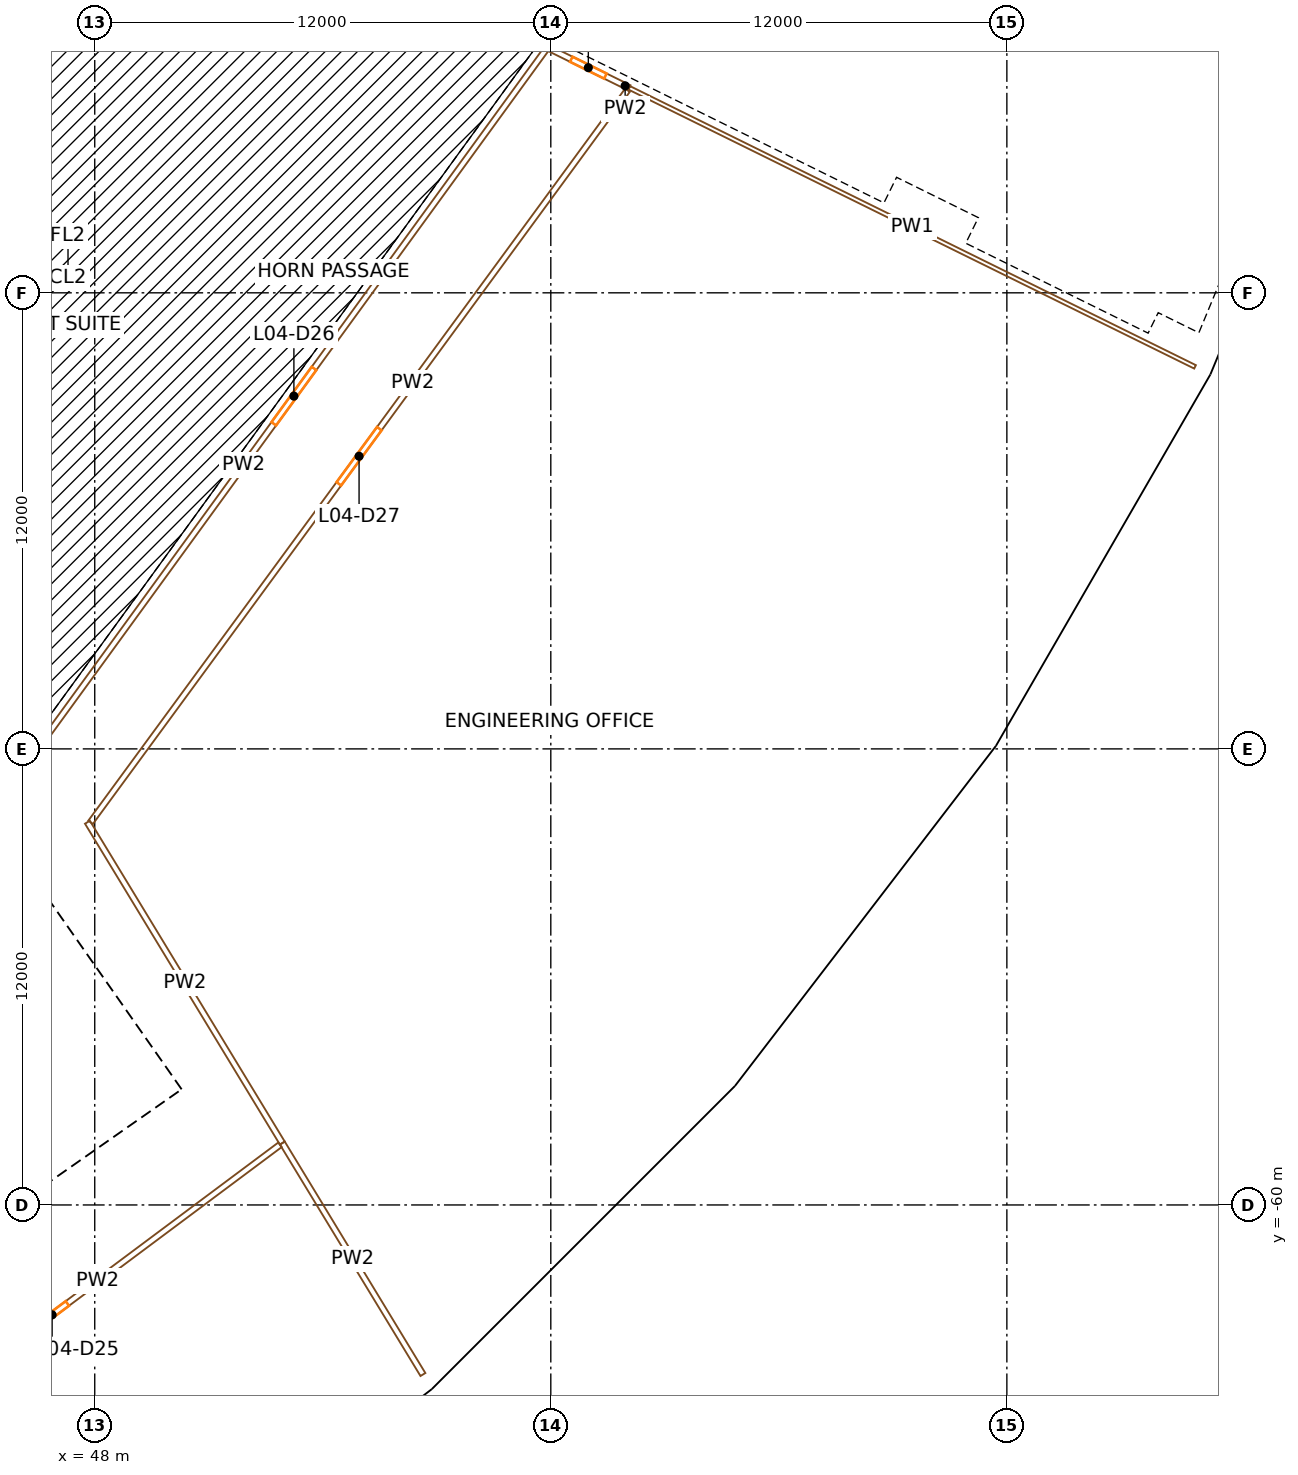
"""IFC4 building model, lengths in metres.
Left out: names, types, materials, properties, quantities, classifications, styles, units other than length and angle.
Written with IfcOpenShell. Run it as: python <this file> out.ifc"""

import sys

from ifc_helpers import new_model, si_unit, direction, frame, frame_2d, origin, origin_2d, place, context, subcontext, project, spatial, rectangle, extrude, element, fill, save


model = new_model("IFC4")
c1 = context("Model", 3, precision=1e-05, world=origin(), true_north=direction((0.0, 1.0)))
c2 = subcontext(c1, "Body", "Model", "MODEL_VIEW")
j1 = project(units=[si_unit("LENGTHUNIT", "METRE"), si_unit("PLANEANGLEUNIT", "RADIAN")], contexts=[c1])
p1 = place(None, origin())
s1 = spatial("IfcSite", under=j1, at=p1, CompositionType="ELEMENT")
p2 = place(p1, origin())
s2 = spatial("IfcBuilding", under=s1, at=p2, CompositionType="ELEMENT")
p3 = place(p2, frame((0.0, 0.0, 31.5)))
s3 = spatial("IfcBuildingStorey", under=s2, at=p3, CompositionType="ELEMENT", Elevation=31.5)
p4 = place(p3, frame((51.264, -58.456, 0.0), z_axis=(0.0, 0.0, 1.0), x_axis=(0.751839807479, 0.6593458151, 0.0)))
e1 = element("IfcColumn", 1, at=p4, inside=s3, PredefinedType="COLUMN", context=c2, shape_type="SweptSolid", body=[
    extrude(rectangle(XDim=1.4, YDim=1.8, at=origin_2d()), origin(), (0.0, 0.0, 1.0), 4.5),
])
p5 = place(p3, frame((56.209, -64.094, 0.0), z_axis=(0.0, 0.0, 1.0), x_axis=(0.751839807479, 0.6593458151, 0.0)))
e2 = element("IfcColumn", 2, at=p5, inside=s3, PredefinedType="COLUMN", context=c2, shape_type="SweptSolid", body=[
    extrude(rectangle(XDim=1.1, YDim=1.3, at=origin_2d()), origin(), (0.0, 0.0, 1.0), 4.5),
])
p6 = place(p3, frame((58.456, -51.264, 0.0), z_axis=(0.0, 0.0, 1.0), x_axis=(0.6593458151, 0.751839807479, 0.0)))
e3 = element("IfcColumn", 3, at=p6, inside=s3, PredefinedType="COLUMN", context=c2, shape_type="SweptSolid", body=[
    extrude(rectangle(XDim=1.4, YDim=1.8, at=origin_2d()), origin(), (0.0, 0.0, 1.0), 4.5),
])
p7 = place(p3, frame((64.094, -56.209, 0.0), z_axis=(0.0, 0.0, 1.0), x_axis=(0.6593458151, 0.751839807479, 0.0)))
e4 = element("IfcColumn", 4, at=p7, inside=s3, PredefinedType="COLUMN", context=c2, shape_type="SweptSolid", body=[
    extrude(rectangle(XDim=1.1, YDim=1.3, at=origin_2d()), origin(), (0.0, 0.0, 1.0), 4.5),
])
for number, where, z_axis, x_axis in (
    (5, (48.433, -32.362, 0.0), (0.0, 0.0, 1.0), (0.556, 0.831, 0.0)),
    (6, (64.647, -43.196, 0.0), (0.0, 0.0, 1.0), (0.556, 0.831, 0.0)),
):
    element("IfcColumn", number, at=place(p3, frame(where, z_axis=z_axis, x_axis=x_axis)), inside=s3, PredefinedType="COLUMN", context=c2, shape_type="SweptSolid", body=[
        extrude(rectangle(XDim=1.4, YDim=1.8, at=origin_2d()), origin(), (0.0, 0.0, 1.0), 4.5),
    ])
p8 = place(p3, frame((70.883, -47.362, 0.0), z_axis=(0.0, 0.0, 1.0), x_axis=(0.55557023302, 0.831469612303, 0.0)))
e7 = element("IfcColumn", 7, at=p8, inside=s3, PredefinedType="COLUMN", context=c2, shape_type="SweptSolid", body=[
    extrude(rectangle(XDim=1.1, YDim=1.3, at=origin_2d()), origin(), (0.0, 0.0, 1.0), 4.5),
])
p9 = place(p3, frame((69.732, -34.388, 0.0), z_axis=(0.0, 0.0, 1.0), x_axis=(0.442288690219, 0.896872741533, 0.0)))
e8 = element("IfcColumn", 8, at=p9, inside=s3, PredefinedType="COLUMN", context=c2, shape_type="SweptSolid", body=[
    extrude(rectangle(XDim=1.4, YDim=1.8, at=origin_2d()), origin(), (0.0, 0.0, 1.0), 4.5),
])
p10 = place(p3, frame((76.458, -37.705, 0.0), z_axis=(0.0, 0.0, 1.0), x_axis=(0.442288690219, 0.896872741533, 0.0)))
e9 = element("IfcColumn", 9, at=p10, inside=s3, PredefinedType="COLUMN", context=c2, shape_type="SweptSolid", body=[
    extrude(rectangle(XDim=1.1, YDim=1.3, at=origin_2d()), origin(), (0.0, 0.0, 1.0), 4.5),
])
p11 = place(p3, frame((49.779, -57.191, 0.0), z_axis=(0.0, 0.0, 1.0), x_axis=(-0.573577477574, 0.819151315216, 0.0)))
e10 = element("IfcWall", 10, at=p11, inside=s3, PredefinedType="SHEAR", context=c2, shape_type="SweptSolid", body=[
    extrude(rectangle(XDim=14.8, YDim=0.9, at=frame_2d((7.4, 0.0))), origin(), (0.0, 0.0, 1.0), 4.1),
])
p12 = place(p11, frame((6.7, 0.0, 0.0)))
e11 = element("IfcOpeningElement", 11, at=p12, cuts=e10, PredefinedType="OPENING", context=c2, shape_type="SweptSolid", body=[
    extrude(rectangle(XDim=1.4, YDim=2.1, at=frame_2d((0.7, 1.05))), frame((0.0, 0.46, 0.0), z_axis=(0.0, -1.0, 0.0), x_axis=(1.0, 0.0, 0.0)), (0.0, 0.0, 1.0), 0.92),
])
p13 = place(p3, frame((36.827, -65.71, 0.0), z_axis=(0.0, 0.0, 1.0), x_axis=(0.819153391756, 0.573574511963, 0.0)))
e12 = element("IfcWall", 12, at=p13, inside=s3, PredefinedType="SHEAR", context=c2, shape_type="SweptSolid", body=[
    extrude(rectangle(XDim=15.045, YDim=0.9, at=frame_2d((7.523, 0.0))), origin(), (0.0, 0.0, 1.0), 4.1),
])
p14 = place(p13, frame((0.6, 0.0, 0.0)))
e13 = element("IfcOpeningElement", 13, at=p14, cuts=e12, PredefinedType="OPENING", context=c2, shape_type="SweptSolid", body=[
    extrude(rectangle(XDim=1.0, YDim=2.1, at=frame_2d((0.5, 1.05))), frame((0.0, 0.46, 0.0), z_axis=(0.0, -1.0, 0.0), x_axis=(1.0, 0.0, 0.0)), (0.0, 0.0, 1.0), 0.92),
])
p15 = place(p13, frame((3.275, 0.0, 0.0)))
e14 = element("IfcOpeningElement", 14, at=p15, cuts=e12, PredefinedType="OPENING", context=c2, shape_type="SweptSolid", body=[
    extrude(rectangle(XDim=1.0, YDim=2.1, at=frame_2d((0.5, 1.05))), frame((0.0, 0.46, 0.0), z_axis=(0.0, -1.0, 0.0), x_axis=(1.0, 0.0, 0.0)), (0.0, 0.0, 1.0), 0.92),
])
p16 = place(p13, frame((6.175, 0.0, 0.0)))
e15 = element("IfcOpeningElement", 15, at=p16, cuts=e12, PredefinedType="OPENING", context=c2, shape_type="SweptSolid", body=[
    extrude(rectangle(XDim=1.0, YDim=2.1, at=frame_2d((0.5, 1.05))), frame((0.0, 0.46, 0.0), z_axis=(0.0, -1.0, 0.0), x_axis=(1.0, 0.0, 0.0)), (0.0, 0.0, 1.0), 0.92),
])
p17 = place(p13, frame((13.495, 0.0, 0.0)))
e16 = element("IfcOpeningElement", 16, at=p17, cuts=e12, PredefinedType="OPENING", context=c2, shape_type="SweptSolid", body=[
    extrude(rectangle(XDim=1.1, YDim=2.1, at=frame_2d((0.55, 1.05))), frame((0.0, 0.46, 0.0), z_axis=(0.0, -1.0, 0.0), x_axis=(1.0, 0.0, 0.0)), (0.0, 0.0, 1.0), 0.92),
])
p18 = place(p3, frame((41.262, -57.661, 0.0), z_axis=(0.0, 0.0, 1.0), x_axis=(0.819164398642, 0.573558792102, 0.0)))
e17 = element("IfcWall", 17, at=p18, inside=s3, PredefinedType="SOLIDWALL", context=c2, shape_type="SweptSolid", body=[
    extrude(rectangle(XDim=6.795, YDim=0.3, at=frame_2d((3.397, 0.0))), origin(), (0.0, 0.0, 1.0), 4.1),
])
p19 = place(p18, frame((5.32, 0.0, 0.0)))
e18 = element("IfcOpeningElement", 18, at=p19, cuts=e17, PredefinedType="OPENING", context=c2, shape_type="SweptSolid", body=[
    extrude(rectangle(XDim=1.1, YDim=2.1, at=frame_2d((0.55, 1.05))), frame((0.0, 0.16, 0.0), z_axis=(0.0, -1.0, 0.0), x_axis=(1.0, 0.0, 0.0)), (0.0, 0.0, 1.0), 0.32),
])
p20 = place(p3, frame((47.839, -71.491, 0.0), z_axis=(0.0, 0.0, 1.0), x_axis=(0.793355377778, 0.608758773695, 0.0)))
e19 = element("IfcWall", 19, at=p20, inside=s3, PredefinedType="SOLIDWALL", context=c2, shape_type="SweptSolid", body=[
    extrude(rectangle(XDim=11.135, YDim=0.45, at=frame_2d((5.567, 0.0))), origin(), (0.0, 0.0, 1.0), 3.2),
])
p21 = place(p20, frame((3.917, 0.0, 0.9)))
e20 = element("IfcOpeningElement", 20, at=p21, cuts=e19, PredefinedType="OPENING", context=c2, shape_type="SweptSolid", body=[
    extrude(rectangle(XDim=1.2, YDim=2.15, at=frame_2d((0.6, 1.075))), frame((0.0, 0.235, 0.0), z_axis=(0.0, -1.0, 0.0), x_axis=(1.0, 0.0, 0.0)), (0.0, 0.0, 1.0), 0.47),
])
p22 = place(p20, frame((6.017, 0.0, 0.9)))
e21 = element("IfcOpeningElement", 21, at=p22, cuts=e19, PredefinedType="OPENING", context=c2, shape_type="SweptSolid", body=[
    extrude(rectangle(XDim=1.2, YDim=2.15, at=frame_2d((0.6, 1.075))), frame((0.0, 0.235, 0.0), z_axis=(0.0, -1.0, 0.0), x_axis=(1.0, 0.0, 0.0)), (0.0, 0.0, 1.0), 0.47),
])
p23 = place(p3, frame((56.699, -64.698, 0.0), z_axis=(0.0, 0.0, 1.0), x_axis=(0.707106781187, 0.707106781187, 0.0)))
e22 = element("IfcWall", 22, at=p23, inside=s3, PredefinedType="SOLIDWALL", context=c2, shape_type="SweptSolid", body=[
    extrude(rectangle(XDim=11.312, YDim=0.45, at=frame_2d((5.656, 0.0))), origin(), (0.0, 0.0, 1.0), 3.2),
])
p24 = place(p23, frame((4.006, 0.0, 0.9)))
e23 = element("IfcOpeningElement", 23, at=p24, cuts=e22, PredefinedType="OPENING", context=c2, shape_type="SweptSolid", body=[
    extrude(rectangle(XDim=1.2, YDim=2.15, at=frame_2d((0.6, 1.075))), frame((0.0, 0.235, 0.0), z_axis=(0.0, -1.0, 0.0), x_axis=(1.0, 0.0, 0.0)), (0.0, 0.0, 1.0), 0.47),
])
p25 = place(p23, frame((6.106, 0.0, 0.9)))
e24 = element("IfcOpeningElement", 24, at=p25, cuts=e22, PredefinedType="OPENING", context=c2, shape_type="SweptSolid", body=[
    extrude(rectangle(XDim=1.2, YDim=2.15, at=frame_2d((0.6, 1.075))), frame((0.0, 0.235, 0.0), z_axis=(0.0, -1.0, 0.0), x_axis=(1.0, 0.0, 0.0)), (0.0, 0.0, 1.0), 0.47),
])
p26 = place(p3, frame((64.713, -56.673, 0.0), z_axis=(0.0, 0.0, 1.0), x_axis=(0.608758773695, 0.793355377778, 0.0)))
e25 = element("IfcWall", 25, at=p26, inside=s3, PredefinedType="SOLIDWALL", context=c2, shape_type="SweptSolid", body=[
    extrude(rectangle(XDim=11.135, YDim=0.45, at=frame_2d((5.567, 0.0))), origin(), (0.0, 0.0, 1.0), 3.2),
])
p27 = place(p26, frame((3.917, 0.0, 0.9)))
e26 = element("IfcOpeningElement", 26, at=p27, cuts=e25, PredefinedType="OPENING", context=c2, shape_type="SweptSolid", body=[
    extrude(rectangle(XDim=1.2, YDim=2.15, at=frame_2d((0.6, 1.075))), frame((0.0, 0.235, 0.0), z_axis=(0.0, -1.0, 0.0), x_axis=(1.0, 0.0, 0.0)), (0.0, 0.0, 1.0), 0.47),
])
p28 = place(p26, frame((6.017, 0.0, 0.9)))
e27 = element("IfcOpeningElement", 27, at=p28, cuts=e25, PredefinedType="OPENING", context=c2, shape_type="SweptSolid", body=[
    extrude(rectangle(XDim=1.2, YDim=2.15, at=frame_2d((0.6, 1.075))), frame((0.0, 0.235, 0.0), z_axis=(0.0, -1.0, 0.0), x_axis=(1.0, 0.0, 0.0)), (0.0, 0.0, 1.0), 0.47),
])
p29 = place(p3, frame((71.512, -47.819, 0.0), z_axis=(0.0, 0.0, 1.0), x_axis=(0.500001430823, 0.866024577697, 0.0)))
e28 = element("IfcWall", 28, at=p29, inside=s3, PredefinedType="SOLIDWALL", context=c2, shape_type="SweptSolid", body=[
    extrude(rectangle(XDim=11.312, YDim=0.45, at=frame_2d((5.656, 0.0))), origin(), (0.0, 0.0, 1.0), 3.2),
])
p30 = place(p29, frame((4.006, 0.0, 0.9)))
e29 = element("IfcOpeningElement", 29, at=p30, cuts=e28, PredefinedType="OPENING", context=c2, shape_type="SweptSolid", body=[
    extrude(rectangle(XDim=1.2, YDim=2.15, at=frame_2d((0.6, 1.075))), frame((0.0, 0.235, 0.0), z_axis=(0.0, -1.0, 0.0), x_axis=(1.0, 0.0, 0.0)), (0.0, 0.0, 1.0), 0.47),
])
p31 = place(p29, frame((6.106, 0.0, 0.9)))
e30 = element("IfcOpeningElement", 30, at=p31, cuts=e28, PredefinedType="OPENING", context=c2, shape_type="SweptSolid", body=[
    extrude(rectangle(XDim=1.2, YDim=2.15, at=frame_2d((0.6, 1.075))), frame((0.0, 0.235, 0.0), z_axis=(0.0, -1.0, 0.0), x_axis=(1.0, 0.0, 0.0)), (0.0, 0.0, 1.0), 0.47),
])
p32 = place(p3, frame((77.176, -37.993, 0.0), z_axis=(0.0, 0.0, 1.0), x_axis=(0.382700611107, 0.923872416656, 0.0)))
e31 = element("IfcWall", 31, at=p32, inside=s3, PredefinedType="SOLIDWALL", context=c2, shape_type="SweptSolid", body=[
    extrude(rectangle(XDim=11.168, YDim=0.45, at=frame_2d((5.584, 0.0))), origin(), (0.0, 0.0, 1.0), 3.2),
])
p33 = place(p32, frame((3.917, 0.0, 0.9)))
e32 = element("IfcOpeningElement", 32, at=p33, cuts=e31, PredefinedType="OPENING", context=c2, shape_type="SweptSolid", body=[
    extrude(rectangle(XDim=1.2, YDim=2.15, at=frame_2d((0.6, 1.075))), frame((0.0, 0.235, 0.0), z_axis=(0.0, -1.0, 0.0), x_axis=(1.0, 0.0, 0.0)), (0.0, 0.0, 1.0), 0.47),
])
p34 = place(p32, frame((6.017, 0.0, 0.9)))
e33 = element("IfcOpeningElement", 33, at=p34, cuts=e31, PredefinedType="OPENING", context=c2, shape_type="SweptSolid", body=[
    extrude(rectangle(XDim=1.2, YDim=2.15, at=frame_2d((0.6, 1.075))), frame((0.0, 0.235, 0.0), z_axis=(0.0, -1.0, 0.0), x_axis=(1.0, 0.0, 0.0)), (0.0, 0.0, 1.0), 0.47),
])
p35 = place(p3, frame((52.875, -58.417, 0.0), z_axis=(0.0, 0.0, 1.0), x_axis=(-0.801483412858, -0.598017005539, 0.0)))
e34 = element("IfcWall", 34, at=p35, inside=s3, PredefinedType="PARTITIONING", context=c2, shape_type="SweptSolid", body=[
    extrude(rectangle(XDim=14.965, YDim=0.15, at=frame_2d((7.483, 0.0))), origin(), (0.0, 0.0, 1.0), 3.1),
])
p36 = place(p35, frame((6.983, 0.0, 0.0)))
e35 = element("IfcOpeningElement", 35, at=p36, cuts=e34, PredefinedType="OPENING", context=c2, shape_type="SweptSolid", body=[
    extrude(rectangle(XDim=1.0, YDim=2.1, at=frame_2d((0.5, 1.05))), frame((0.0, 0.085, 0.0), z_axis=(0.0, -1.0, 0.0), x_axis=(1.0, 0.0, 0.0)), (0.0, 0.0, 1.0), 0.17),
])
p37 = place(p3, frame((46.614, -47.83, 0.0), z_axis=(0.0, 0.0, 1.0), x_axis=(0.588142064446, 0.808757634912, 0.0)))
e36 = element("IfcWall", 36, at=p37, inside=s3, PredefinedType="PARTITIONING", context=c2, shape_type="SweptSolid", body=[
    extrude(rectangle(XDim=22.534, YDim=0.15, at=frame_2d((11.267, 0.0))), origin(), (0.0, 0.0, 1.0), 3.1),
])
p38 = place(p37, frame((10.367, 0.0, 0.0)))
e37 = element("IfcOpeningElement", 37, at=p38, cuts=e36, PredefinedType="OPENING", context=c2, shape_type="SweptSolid", body=[
    extrude(rectangle(XDim=1.8, YDim=2.1, at=frame_2d((0.9, 1.05))), frame((0.0, 0.085, 0.0), z_axis=(0.0, -1.0, 0.0), x_axis=(1.0, 0.0, 0.0)), (0.0, 0.0, 1.0), 0.17),
])
p39 = place(p3, frame((47.808, -49.929, 0.0), z_axis=(0.0, 0.0, 1.0), x_axis=(0.519169679695, -0.854671190392, 0.0)))
e38 = element("IfcWall", 38, at=p39, inside=s3, PredefinedType="PARTITIONING", context=c2, shape_type="SweptSolid", body=[
    extrude(rectangle(XDim=9.878, YDim=0.15, at=frame_2d((4.939, 0.0))), origin(), (0.0, 0.0, 1.0), 3.1),
])
p40 = place(p3, frame((62.019, -30.667, 0.0), z_axis=(0.0, 0.0, 1.0), x_axis=(-0.59135701849, -0.806409868915, 0.0)))
e39 = element("IfcWall", 39, at=p40, inside=s3, PredefinedType="PARTITIONING", context=c2, shape_type="SweptSolid", body=[
    extrude(rectangle(XDim=23.892, YDim=0.15, at=frame_2d((11.946, 0.0))), origin(), (0.0, 0.0, 1.0), 3.1),
])
p41 = place(p40, frame((11.046, 0.0, 0.0)))
e40 = element("IfcOpeningElement", 40, at=p41, cuts=e39, PredefinedType="OPENING", context=c2, shape_type="SweptSolid", body=[
    extrude(rectangle(XDim=1.8, YDim=2.1, at=frame_2d((0.9, 1.05))), frame((0.0, 0.085, 0.0), z_axis=(0.0, -1.0, 0.0), x_axis=(1.0, 0.0, 0.0)), (0.0, 0.0, 1.0), 0.17),
])
p42 = place(p3, frame((52.936, -58.372, 0.0), z_axis=(0.0, 0.0, 1.0), x_axis=(0.519148894699, -0.854683815883, 0.0)))
e41 = element("IfcWall", 41, at=p42, inside=s3, PredefinedType="PARTITIONING", context=c2, shape_type="SweptSolid", body=[
    extrude(rectangle(XDim=7.125, YDim=0.15, at=frame_2d((3.563, 0.0))), origin(), (0.0, 0.0, 1.0), 3.1),
])
p43 = place(p3, frame((59.911, -29.545, 0.0), z_axis=(0.0, 0.0, 1.0), x_axis=(0.896855391649, -0.442323870564, 0.0)))
e42 = element("IfcWall", 42, at=p43, inside=s3, PredefinedType="PARTITIONING", context=c2, shape_type="SweptSolid", body=[
    extrude(rectangle(XDim=2.4, YDim=0.15, at=frame_2d((1.2, 0.0))), origin(), (0.0, 0.0, 1.0), 3.1),
])
p44 = place(p43, frame((0.7, 0.0, 0.0)))
e43 = element("IfcOpeningElement", 43, at=p44, cuts=e42, PredefinedType="OPENING", context=c2, shape_type="SweptSolid", body=[
    extrude(rectangle(XDim=1.0, YDim=2.1, at=frame_2d((0.5, 1.05))), frame((0.0, 0.085, 0.0), z_axis=(0.0, -1.0, 0.0), x_axis=(1.0, 0.0, 0.0)), (0.0, 0.0, 1.0), 0.17),
])
p45 = place(p3, frame((76.952, -37.948, 0.0), z_axis=(0.0, 0.0, 1.0), x_axis=(-0.896872708689, 0.44228875682, 0.0)))
e44 = element("IfcWall", 44, at=p45, inside=s3, PredefinedType="PARTITIONING", context=c2, shape_type="SweptSolid", body=[
    extrude(rectangle(XDim=16.6, YDim=0.1, at=frame_2d((8.3, 0.0))), origin(), (0.0, 0.0, 1.0), 3.1),
])
p46 = place(p17, origin())
e45 = element("IfcDoor", 45, at=p46, inside=s3, OperationType="SINGLE_SWING_LEFT", PredefinedType="DOOR", context=c2, shape_type="SweptSolid", body=[
    extrude(rectangle(XDim=1.1, YDim=2.1, at=frame_2d((0.55, 1.05))), frame((0.0, 0.025, 0.0), z_axis=(0.0, -1.0, 0.0), x_axis=(1.0, 0.0, 0.0)), (0.0, 0.0, 1.0), 0.05),
])
fill(e16, e45)
p47 = place(p24, origin())
e46 = element("IfcWindow", 46, at=p47, inside=s3, PartitioningType="SINGLE_PANEL", PredefinedType="WINDOW", context=c2, shape_type="SweptSolid", body=[
    extrude(rectangle(XDim=1.2, YDim=2.15, at=frame_2d((0.6, 1.075))), frame((0.0, 0.03, 0.0), z_axis=(0.0, -1.0, 0.0), x_axis=(1.0, 0.0, 0.0)), (0.0, 0.0, 1.0), 0.06),
])
fill(e23, e46)
p48 = place(p25, origin())
e47 = element("IfcWindow", 47, at=p48, inside=s3, PartitioningType="SINGLE_PANEL", PredefinedType="WINDOW", context=c2, shape_type="SweptSolid", body=[
    extrude(rectangle(XDim=1.2, YDim=2.15, at=frame_2d((0.6, 1.075))), frame((0.0, 0.03, 0.0), z_axis=(0.0, -1.0, 0.0), x_axis=(1.0, 0.0, 0.0)), (0.0, 0.0, 1.0), 0.06),
])
fill(e24, e47)
p49 = place(p27, origin())
e48 = element("IfcWindow", 48, at=p49, inside=s3, PartitioningType="SINGLE_PANEL", PredefinedType="WINDOW", context=c2, shape_type="SweptSolid", body=[
    extrude(rectangle(XDim=1.2, YDim=2.15, at=frame_2d((0.6, 1.075))), frame((0.0, 0.03, 0.0), z_axis=(0.0, -1.0, 0.0), x_axis=(1.0, 0.0, 0.0)), (0.0, 0.0, 1.0), 0.06),
])
fill(e26, e48)
p50 = place(p28, origin())
e49 = element("IfcWindow", 49, at=p50, inside=s3, PartitioningType="SINGLE_PANEL", PredefinedType="WINDOW", context=c2, shape_type="SweptSolid", body=[
    extrude(rectangle(XDim=1.2, YDim=2.15, at=frame_2d((0.6, 1.075))), frame((0.0, 0.03, 0.0), z_axis=(0.0, -1.0, 0.0), x_axis=(1.0, 0.0, 0.0)), (0.0, 0.0, 1.0), 0.06),
])
fill(e27, e49)
p51 = place(p30, origin())
e50 = element("IfcWindow", 50, at=p51, inside=s3, PartitioningType="SINGLE_PANEL", PredefinedType="WINDOW", context=c2, shape_type="SweptSolid", body=[
    extrude(rectangle(XDim=1.2, YDim=2.15, at=frame_2d((0.6, 1.075))), frame((0.0, 0.03, 0.0), z_axis=(0.0, -1.0, 0.0), x_axis=(1.0, 0.0, 0.0)), (0.0, 0.0, 1.0), 0.06),
])
fill(e29, e50)
p52 = place(p31, origin())
e51 = element("IfcWindow", 51, at=p52, inside=s3, PartitioningType="SINGLE_PANEL", PredefinedType="WINDOW", context=c2, shape_type="SweptSolid", body=[
    extrude(rectangle(XDim=1.2, YDim=2.15, at=frame_2d((0.6, 1.075))), frame((0.0, 0.03, 0.0), z_axis=(0.0, -1.0, 0.0), x_axis=(1.0, 0.0, 0.0)), (0.0, 0.0, 1.0), 0.06),
])
fill(e30, e51)
p53 = place(p36, origin())
e52 = element("IfcDoor", 52, at=p53, inside=s3, OperationType="SINGLE_SWING_RIGHT", PredefinedType="DOOR", context=c2, shape_type="SweptSolid", body=[
    extrude(rectangle(XDim=1.0, YDim=2.1, at=frame_2d((0.5, 1.05))), frame((0.0, 0.025, 0.0), z_axis=(0.0, -1.0, 0.0), x_axis=(1.0, 0.0, 0.0)), (0.0, 0.0, 1.0), 0.05),
])
fill(e35, e52)
p54 = place(p38, origin())
e53 = element("IfcDoor", 53, at=p54, inside=s3, OperationType="DOUBLE_DOOR_SINGLE_SWING", PredefinedType="DOOR", context=c2, shape_type="SweptSolid", body=[
    extrude(rectangle(XDim=1.8, YDim=2.1, at=frame_2d((0.9, 1.05))), frame((0.0, 0.025, 0.0), z_axis=(0.0, -1.0, 0.0), x_axis=(1.0, 0.0, 0.0)), (0.0, 0.0, 1.0), 0.05),
])
fill(e37, e53)
p55 = place(p41, origin())
e54 = element("IfcDoor", 54, at=p55, inside=s3, OperationType="DOUBLE_DOOR_SINGLE_SWING", PredefinedType="DOOR", context=c2, shape_type="SweptSolid", body=[
    extrude(rectangle(XDim=1.8, YDim=2.1, at=frame_2d((0.9, 1.05))), frame((0.0, 0.025, 0.0), z_axis=(0.0, -1.0, 0.0), x_axis=(1.0, 0.0, 0.0)), (0.0, 0.0, 1.0), 0.05),
])
fill(e40, e54)
p56 = place(p44, origin())
e55 = element("IfcDoor", 55, at=p56, inside=s3, OperationType="SINGLE_SWING_RIGHT", PredefinedType="DOOR", context=c2, shape_type="SweptSolid", body=[
    extrude(rectangle(XDim=1.0, YDim=2.1, at=frame_2d((0.5, 1.05))), frame((0.0, 0.025, 0.0), z_axis=(0.0, -1.0, 0.0), x_axis=(1.0, 0.0, 0.0)), (0.0, 0.0, 1.0), 0.05),
])
fill(e43, e55)
save(model, sys.argv[1])
